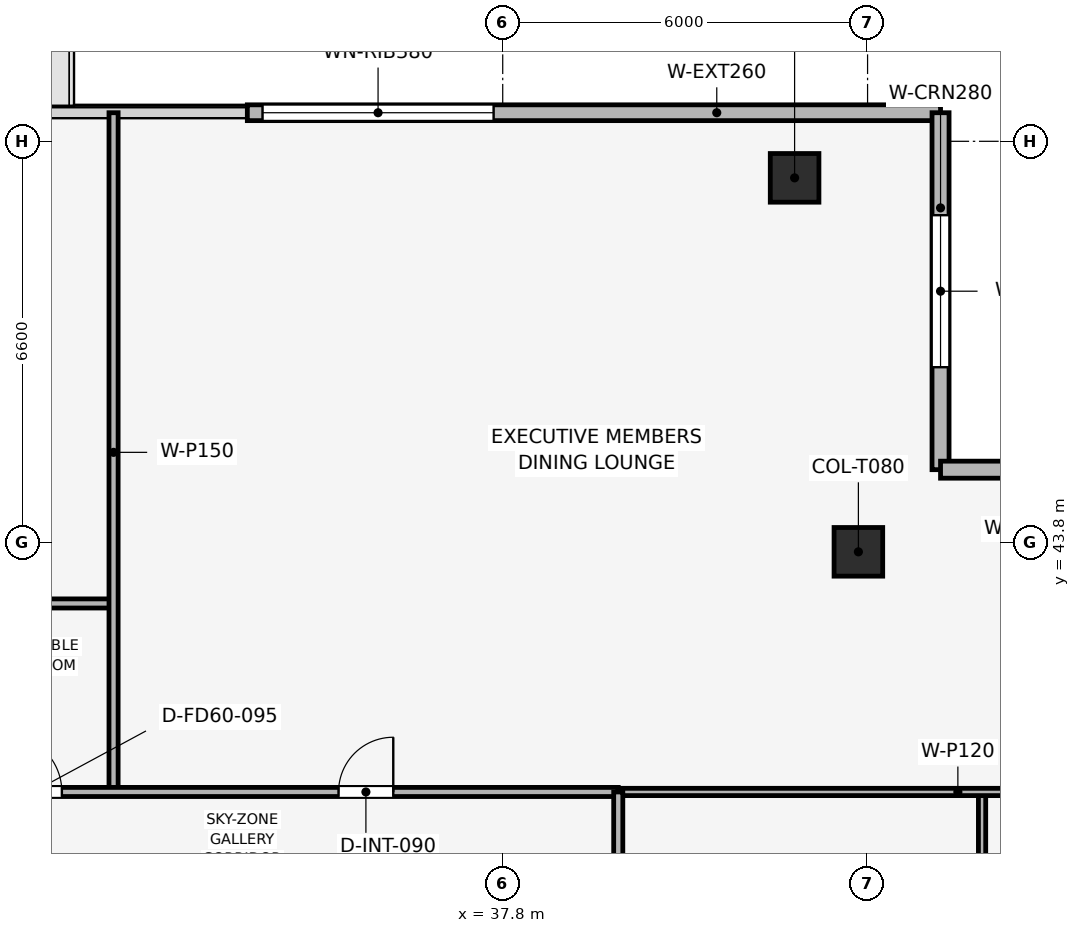
"""IFC4 building model, lengths in metres.
Left out: names, types, materials, properties, quantities, classifications, styles, units other than length and angle.
Written with IfcOpenShell. Run it as: python <this file> out.ifc"""

import sys

from ifc_helpers import new_model, si_unit, direction, frame, frame_2d, origin, origin_2d, place, context, subcontext, project, spatial, rectangle, extrude, element, fill, save


model = new_model("IFC4")
c1 = context("Model", 3, precision=1e-05, world=origin(), true_north=direction((0.0, 1.0)))
c2 = subcontext(c1, "Body", "Model", "MODEL_VIEW")
j1 = project(units=[si_unit("LENGTHUNIT", "METRE"), si_unit("PLANEANGLEUNIT", "RADIAN")], contexts=[c1])
p1 = place(None, origin())
s1 = spatial("IfcSite", under=j1, at=p1, CompositionType="ELEMENT")
p2 = place(p1, origin())
s2 = spatial("IfcBuilding", under=s1, at=p2, CompositionType="ELEMENT")
p3 = place(p2, frame((0.0, 0.0, 340.5)))
s3 = spatial("IfcBuildingStorey", under=s2, at=p3, CompositionType="ELEMENT", Elevation=340.5)
p4 = place(p3, frame((42.6, 49.799, 0.003), z_axis=(-0.026074003672, -0.233311539355, 0.972052401847), x_axis=(0.993813171993, -0.111064752168, 0.0)))
e1 = element("IfcColumn", 1, at=p4, inside=s3, PredefinedType="COLUMN", context=c2, shape_type="SweptSolid", body=[
    extrude(rectangle(XDim=0.8, YDim=0.8, at=origin_2d()), origin(), (0.0, 0.0, 1.0), 3.605),
])
p5 = place(p3, frame((43.649, 43.649, 0.003), z_axis=(-0.180406465102, -0.180406465102, 0.96690589754), x_axis=(0.707106781187, -0.707106781187, 0.0)))
e2 = element("IfcColumn", 2, at=p5, inside=s3, PredefinedType="COLUMN", context=c2, shape_type="SweptSolid", body=[
    extrude(rectangle(XDim=0.8, YDim=0.8, at=origin_2d()), origin(), (0.0, 0.0, 1.0), 3.624),
])
p6 = place(p3, frame((33.6, 50.87, 0.0), z_axis=(0.0, 0.0, 1.0), x_axis=(1.0, 0.0, 0.0)))
e3 = element("IfcWall", 3, at=p6, inside=s3, PredefinedType="SOLIDWALL", context=c2, shape_type="SweptSolid", body=[
    extrude(rectangle(XDim=11.4, YDim=0.26, at=frame_2d((5.7, 0.0))), origin(), (0.0, 0.0, 1.0), 3.51),
])
p7 = place(p6, frame((0.25, 0.0, 0.9)))
e4 = element("IfcOpeningElement", 4, at=p7, cuts=e3, PredefinedType="OPENING", context=c2, shape_type="SweptSolid", body=[
    extrude(rectangle(XDim=3.8, YDim=1.9, at=frame_2d((1.9, 0.95))), frame((0.0, 0.14, 0.0), z_axis=(0.0, -1.0, 0.0), x_axis=(1.0, 0.0, 0.0)), (0.0, 0.0, 1.0), 0.28),
])
p8 = place(p3, frame((45.0, 50.87, 0.0), z_axis=(0.0, 0.0, 1.0), x_axis=(0.0, -1.0, 0.0)))
e5 = element("IfcWall", 5, at=p8, inside=s3, PredefinedType="SOLIDWALL", context=c2, shape_type="SweptSolid", body=[
    extrude(rectangle(XDim=5.87, YDim=0.28, at=frame_2d((2.935, 0.0))), origin(), (0.0, 0.0, 1.0), 3.51),
])
p9 = place(p8, frame((1.685, 0.0, 0.9)))
e6 = element("IfcOpeningElement", 6, at=p9, cuts=e5, PredefinedType="OPENING", context=c2, shape_type="SweptSolid", body=[
    extrude(rectangle(XDim=2.5, YDim=1.9, at=frame_2d((1.25, 0.95))), frame((0.0, 0.15, 0.0), z_axis=(0.0, -1.0, 0.0), x_axis=(1.0, 0.0, 0.0)), (0.0, 0.0, 1.0), 0.3),
])
p10 = place(p3, frame((45.0, 45.0, 0.0), z_axis=(0.0, 0.0, 1.0), x_axis=(1.0, 0.0, 0.0)))
e7 = element("IfcWall", 7, at=p10, inside=s3, PredefinedType="SOLIDWALL", context=c2, shape_type="SweptSolid", body=[
    extrude(rectangle(XDim=5.87, YDim=0.28, at=frame_2d((2.935, 0.0))), origin(), (0.0, 0.0, 1.0), 3.51),
])
p11 = place(p10, frame((1.685, 0.0, 0.9)))
e8 = element("IfcOpeningElement", 8, at=p11, cuts=e7, PredefinedType="OPENING", context=c2, shape_type="SweptSolid", body=[
    extrude(rectangle(XDim=2.5, YDim=1.9, at=frame_2d((1.25, 0.95))), frame((0.0, 0.15, 0.0), z_axis=(0.0, -1.0, 0.0), x_axis=(1.0, 0.0, 0.0)), (0.0, 0.0, 1.0), 0.3),
])
p12 = place(p3, frame((23.0, 42.8, 0.0), z_axis=(0.0, 0.0, 1.0), x_axis=(1.0, 0.0, 0.0)))
e9 = element("IfcWall", 9, at=p12, inside=s3, PredefinedType="PARTITIONING", context=c2, shape_type="SweptSolid", body=[
    extrude(rectangle(XDim=8.4, YDim=0.15, at=frame_2d((4.2, 0.0))), origin(), (0.0, 0.0, 1.0), 3.095),
])
p13 = place(p3, frame((31.4, 39.7, 0.0), z_axis=(0.0, 0.0, 1.0), x_axis=(0.0, 1.0, 0.0)))
e10 = element("IfcWall", 10, at=p13, inside=s3, PredefinedType="PARTITIONING", context=c2, shape_type="SweptSolid", body=[
    extrude(rectangle(XDim=11.17, YDim=0.15, at=frame_2d((5.585, 0.0))), origin(), (0.0, 0.0, 1.0), 3.135),
])
p14 = place(p3, frame((45.683, 24.4, 0.0), z_axis=(0.0, 0.0, 1.0), x_axis=(0.0, 1.0, 0.0)))
e11 = element("IfcWall", 11, at=p14, inside=s3, PredefinedType="PARTITIONING", context=c2, shape_type="SweptSolid", body=[
    extrude(rectangle(XDim=15.3, YDim=0.12, at=frame_2d((7.65, 0.0))), origin(), (0.0, 0.0, 1.0), 3.095),
])
p15 = place(p14, frame((10.7, 0.0, 0.0)))
e12 = element("IfcOpeningElement", 12, at=p15, cuts=e11, PredefinedType="OPENING", context=c2, shape_type="SweptSolid", body=[
    extrude(rectangle(XDim=0.9, YDim=2.1, at=frame_2d((0.45, 1.05))), frame((0.0, 0.07, 0.0), z_axis=(0.0, -1.0, 0.0), x_axis=(1.0, 0.0, 0.0)), (0.0, 0.0, 1.0), 0.14),
])
p16 = place(p3, frame((39.7, 39.7, 0.0), z_axis=(0.0, 0.0, 1.0), x_axis=(1.0, 0.0, 0.0)))
e13 = element("IfcWall", 13, at=p16, inside=s3, PredefinedType="PARTITIONING", context=c2, shape_type="SweptSolid", body=[
    extrude(rectangle(XDim=11.17, YDim=0.12, at=frame_2d((5.585, 0.0))), origin(), (0.0, 0.0, 1.0), 3.095),
])
p17 = place(p3, frame((17.9, 39.7, 0.0), z_axis=(0.0, 0.0, 1.0), x_axis=(1.0, 0.0, 0.0)))
e14 = element("IfcWall", 14, at=p17, inside=s3, PredefinedType="PARTITIONING", context=c2, shape_type="SweptSolid", body=[
    extrude(rectangle(XDim=21.8, YDim=0.15, at=frame_2d((10.9, 0.0))), origin(), (0.0, 0.0, 1.0), 3.095),
])
p18 = place(p17, frame((2.1, 0.0, 0.0)))
e15 = element("IfcOpeningElement", 15, at=p18, cuts=e14, PredefinedType="OPENING", context=c2, shape_type="SweptSolid", body=[
    extrude(rectangle(XDim=0.9, YDim=2.1, at=frame_2d((0.45, 1.05))), frame((0.0, 0.085, 0.0), z_axis=(0.0, -1.0, 0.0), x_axis=(1.0, 0.0, 0.0)), (0.0, 0.0, 1.0), 0.17),
])
p19 = place(p17, frame((6.05, 0.0, 0.0)))
e16 = element("IfcOpeningElement", 16, at=p19, cuts=e14, PredefinedType="OPENING", context=c2, shape_type="SweptSolid", body=[
    extrude(rectangle(XDim=0.9, YDim=2.1, at=frame_2d((0.45, 1.05))), frame((0.0, 0.085, 0.0), z_axis=(0.0, -1.0, 0.0), x_axis=(1.0, 0.0, 0.0)), (0.0, 0.0, 1.0), 0.17),
])
p20 = place(p17, frame((8.95, 0.0, 0.0)))
e17 = element("IfcOpeningElement", 17, at=p20, cuts=e14, PredefinedType="OPENING", context=c2, shape_type="SweptSolid", body=[
    extrude(rectangle(XDim=0.9, YDim=2.1, at=frame_2d((0.45, 1.05))), frame((0.0, 0.085, 0.0), z_axis=(0.0, -1.0, 0.0), x_axis=(1.0, 0.0, 0.0)), (0.0, 0.0, 1.0), 0.17),
])
p21 = place(p17, frame((11.7, 0.0, 0.0)))
e18 = element("IfcOpeningElement", 18, at=p21, cuts=e14, PredefinedType="OPENING", context=c2, shape_type="SweptSolid", body=[
    extrude(rectangle(XDim=0.95, YDim=2.1, at=frame_2d((0.475, 1.05))), frame((0.0, 0.085, 0.0), z_axis=(0.0, -1.0, 0.0), x_axis=(1.0, 0.0, 0.0)), (0.0, 0.0, 1.0), 0.17),
])
p22 = place(p17, frame((17.2, 0.0, 0.0)))
e19 = element("IfcOpeningElement", 19, at=p22, cuts=e14, PredefinedType="OPENING", context=c2, shape_type="SweptSolid", body=[
    extrude(rectangle(XDim=0.9, YDim=2.1, at=frame_2d((0.45, 1.05))), frame((0.0, 0.085, 0.0), z_axis=(0.0, -1.0, 0.0), x_axis=(1.0, 0.0, 0.0)), (0.0, 0.0, 1.0), 0.17),
])
p23 = place(p3, frame((39.7, 24.4, 0.0), z_axis=(0.0, 0.0, 1.0), x_axis=(0.0, 1.0, 0.0)))
e20 = element("IfcWall", 20, at=p23, inside=s3, PredefinedType="PARTITIONING", context=c2, shape_type="SweptSolid", body=[
    extrude(rectangle(XDim=15.3, YDim=0.15, at=frame_2d((7.65, 0.0))), origin(), (0.0, 0.0, 1.0), 3.095),
])
p24 = place(p23, frame((7.2, 0.0, 0.0)))
e21 = element("IfcOpeningElement", 21, at=p24, cuts=e20, PredefinedType="OPENING", context=c2, shape_type="SweptSolid", body=[
    extrude(rectangle(XDim=0.9, YDim=2.1, at=frame_2d((0.45, 1.05))), frame((0.0, 0.085, 0.0), z_axis=(0.0, -1.0, 0.0), x_axis=(1.0, 0.0, 0.0)), (0.0, 0.0, 1.0), 0.17),
])
p25 = place(p7, origin())
e22 = element("IfcWindow", 22, at=p25, inside=s3, PartitioningType="SINGLE_PANEL", PredefinedType="WINDOW", context=c2, shape_type="SweptSolid", body=[
    extrude(rectangle(XDim=3.8, YDim=1.9, at=frame_2d((1.9, 0.95))), frame((0.0, 0.03, 0.0), z_axis=(0.0, -1.0, 0.0), x_axis=(1.0, 0.0, 0.0)), (0.0, 0.0, 1.0), 0.06),
])
fill(e4, e22)
p26 = place(p9, origin())
e23 = element("IfcWindow", 23, at=p26, inside=s3, PartitioningType="SINGLE_PANEL", PredefinedType="WINDOW", context=c2, shape_type="SweptSolid", body=[
    extrude(rectangle(XDim=2.5, YDim=1.9, at=frame_2d((1.25, 0.95))), frame((0.0, 0.03, 0.0), z_axis=(0.0, -1.0, 0.0), x_axis=(1.0, 0.0, 0.0)), (0.0, 0.0, 1.0), 0.06),
])
fill(e6, e23)
p27 = place(p21, origin())
e24 = element("IfcDoor", 24, at=p27, inside=s3, OperationType="SINGLE_SWING_LEFT", PredefinedType="DOOR", context=c2, shape_type="SweptSolid", body=[
    extrude(rectangle(XDim=0.95, YDim=2.1, at=frame_2d((0.475, 1.05))), frame((0.0, 0.025, 0.0), z_axis=(0.0, -1.0, 0.0), x_axis=(1.0, 0.0, 0.0)), (0.0, 0.0, 1.0), 0.05),
])
fill(e18, e24)
p28 = place(p22, origin())
e25 = element("IfcDoor", 25, at=p28, inside=s3, OperationType="SINGLE_SWING_RIGHT", PredefinedType="DOOR", context=c2, shape_type="SweptSolid", body=[
    extrude(rectangle(XDim=0.9, YDim=2.1, at=frame_2d((0.45, 1.05))), frame((0.0, 0.025, 0.0), z_axis=(0.0, -1.0, 0.0), x_axis=(1.0, 0.0, 0.0)), (0.0, 0.0, 1.0), 0.05),
])
fill(e19, e25)
save(model, sys.argv[1])
